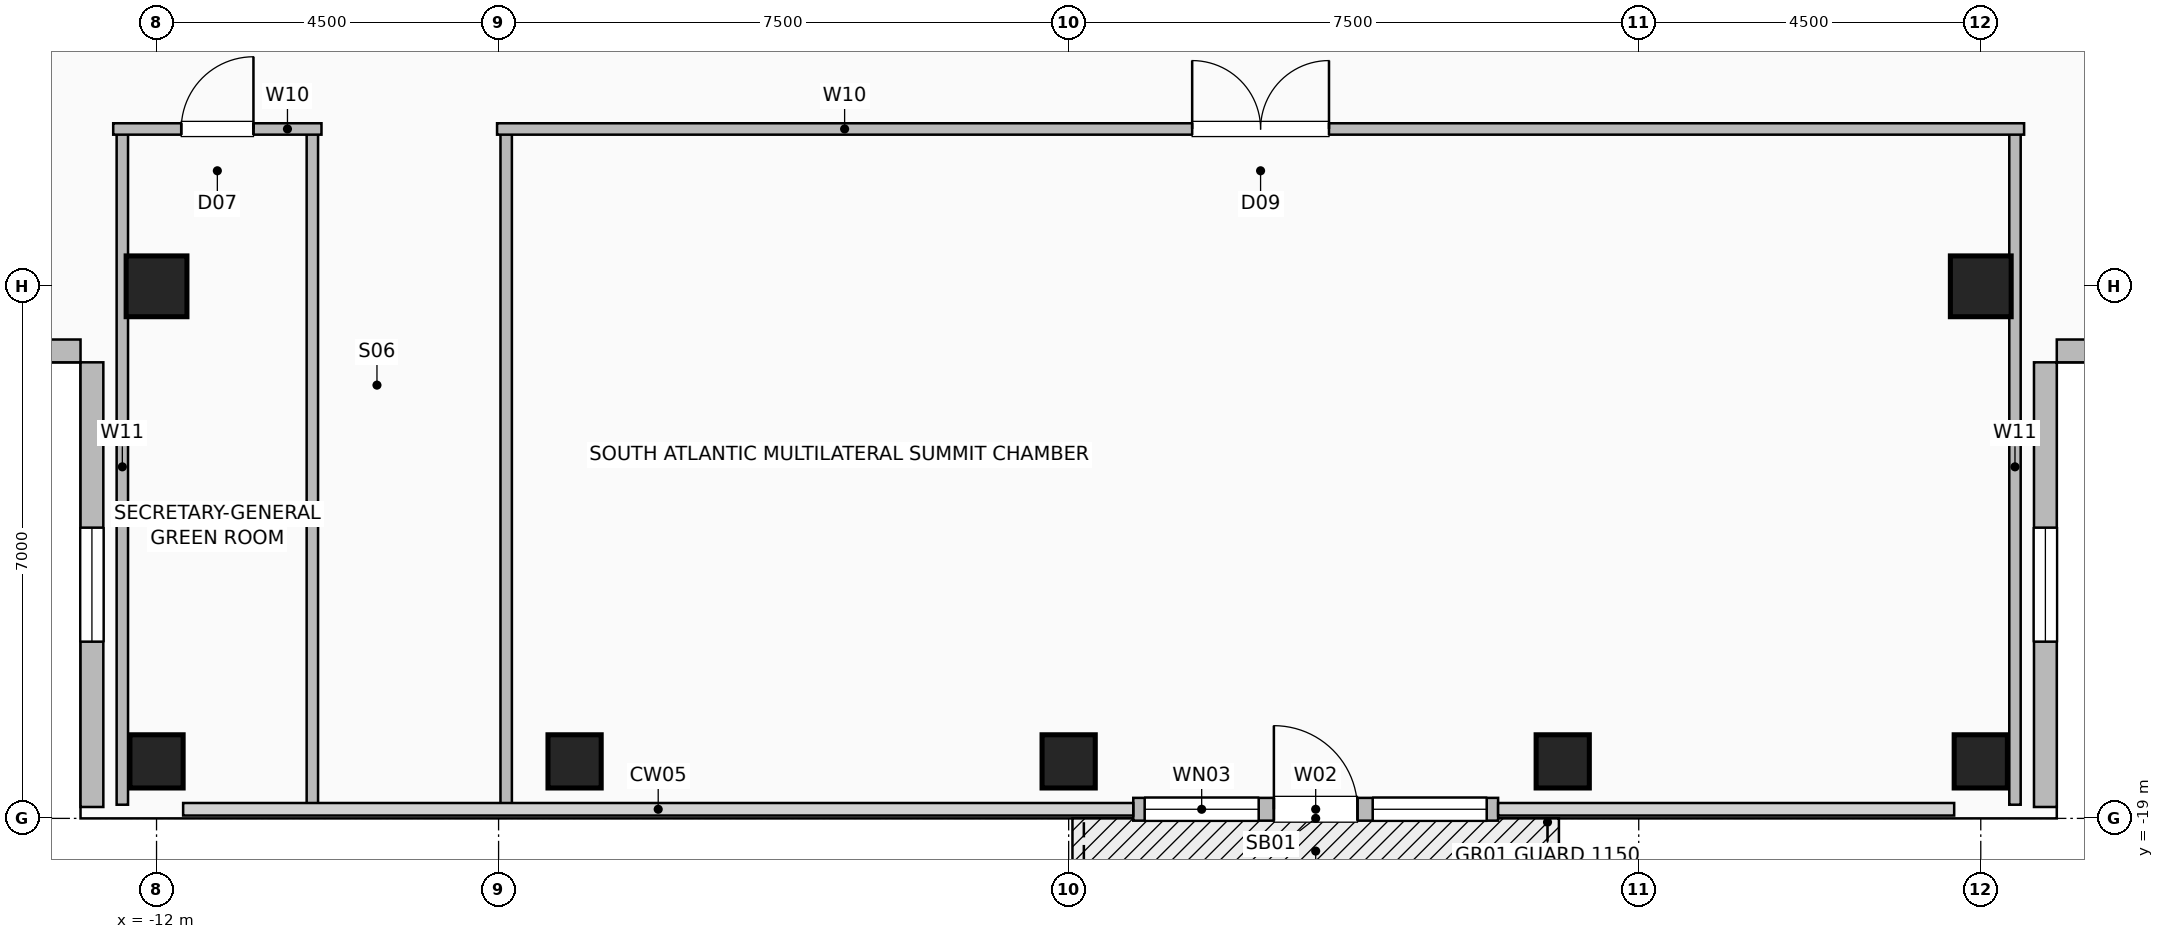
"""IFC4 building model, lengths in metres.
Left out: names, types, materials, properties, quantities, classifications, styles, units other than length and angle.
Written with IfcOpenShell. Run it as: python <this file> out.ifc"""

import sys

from ifc_helpers import new_model, si_unit, direction, frame, frame_2d, origin, origin_2d, place, context, subcontext, project, spatial, rectangle, hollow_rectangle, extrude, element, fill, save


model = new_model("IFC4")
c1 = context("Model", 3, precision=1e-05, world=origin(), true_north=direction((0.0, 1.0)))
c2 = subcontext(c1, "Body", "Model", "MODEL_VIEW")
j1 = project(units=[si_unit("LENGTHUNIT", "METRE"), si_unit("PLANEANGLEUNIT", "RADIAN")], contexts=[c1])
p1 = place(None, origin())
s1 = spatial("IfcSite", under=j1, at=p1, CompositionType="ELEMENT")
p2 = place(p1, origin())
s2 = spatial("IfcBuilding", under=s1, at=p2, CompositionType="ELEMENT")
p3 = place(p2, frame((0.0, 0.0, 243.2)))
s3 = spatial("IfcBuildingStorey", under=s2, at=p3, CompositionType="ELEMENT", Elevation=243.2)
for number, where, z_axis, x_axis in (
    (1, (-12.0, -18.25, 0.0), (0.0, 0.0, 1.0), (1.0, 0.0, 0.0)),
    (2, (-6.5, -18.25, 0.0), (0.0, 0.0, 1.0), (1.0, 0.0, 0.0)),
    (3, (0.0, -18.25, 0.0), (0.0, 0.0, 1.0), (1.0, 0.0, 0.0)),
    (4, (6.5, -18.25, 0.0), (0.0, 0.0, 1.0), (1.0, 0.0, 0.0)),
    (5, (12.0, -18.25, 0.0), (0.0, 0.0, 1.0), (1.0, 0.0, 0.0)),
):
    element("IfcColumn", number, at=place(p3, frame(where, z_axis=z_axis, x_axis=x_axis)), inside=s3, PredefinedType="COLUMN", context=c2, shape_type="SweptSolid", body=[
        extrude(hollow_rectangle(XDim=0.7, YDim=0.7, WallThickness=0.035, at=origin_2d()), origin(), (0.0, 0.0, 1.0), 3.6),
    ])
for number, where, z_axis, x_axis in (
    (6, (-12.0, -12.0, 0.0), (0.0, 0.0, 1.0), (1.0, 0.0, 0.0)),
    (7, (12.0, -12.0, 0.0), (0.0, 0.0, 1.0), (1.0, 0.0, 0.0)),
):
    element("IfcColumn", number, at=place(p3, frame(where, z_axis=z_axis, x_axis=x_axis)), inside=s3, PredefinedType="COLUMN", context=c2, shape_type="SweptSolid", body=[
        extrude(hollow_rectangle(XDim=0.8, YDim=0.8, WallThickness=0.04, at=origin_2d()), origin(), (0.0, 0.0, 1.0), 3.6),
    ])
p4 = place(p3, frame((0.85, -18.88, 0.0), z_axis=(0.0, 0.0, 1.0), x_axis=(1.0, 0.0, 0.0)))
e8 = element("IfcWall", 8, at=p4, inside=s3, PredefinedType="SOLIDWALL", context=c2, shape_type="SweptSolid", body=[
    extrude(rectangle(XDim=4.8, YDim=0.3, at=frame_2d((2.4, 0.0))), origin(), (0.0, 0.0, 1.0), 3.36),
])
p5 = place(p4, frame((1.85, 0.0, 0.0)))
e9 = element("IfcOpeningElement", 9, at=p5, cuts=e8, PredefinedType="OPENING", context=c2, shape_type="SweptSolid", body=[
    extrude(rectangle(XDim=1.1, YDim=2.2, at=frame_2d((0.55, 1.1))), frame((0.0, 0.16, 0.0), z_axis=(0.0, -1.0, 0.0), x_axis=(1.0, 0.0, 0.0)), (0.0, 0.0, 1.0), 0.32),
])
p6 = place(p4, frame((0.15, 0.0, 0.85)))
e10 = element("IfcOpeningElement", 10, at=p6, cuts=e8, PredefinedType="OPENING", context=c2, shape_type="SweptSolid", body=[
    extrude(rectangle(XDim=1.5, YDim=1.8, at=frame_2d((0.75, 0.9))), frame((0.0, 0.16, 0.0), z_axis=(0.0, -1.0, 0.0), x_axis=(1.0, 0.0, 0.0)), (0.0, 0.0, 1.0), 0.32),
])
p7 = place(p4, frame((3.15, 0.0, 0.85)))
e11 = element("IfcOpeningElement", 11, at=p7, cuts=e8, PredefinedType="OPENING", context=c2, shape_type="SweptSolid", body=[
    extrude(rectangle(XDim=1.5, YDim=1.8, at=frame_2d((0.75, 0.9))), frame((0.0, 0.16, 0.0), z_axis=(0.0, -1.0, 0.0), x_axis=(1.0, 0.0, 0.0)), (0.0, 0.0, 1.0), 0.32),
])
p8 = place(p3, frame((-12.85, -18.85, 0.0), z_axis=(0.0, 0.0, 1.0), x_axis=(0.0, 1.0, 0.0)))
e12 = element("IfcWall", 12, at=p8, inside=s3, PredefinedType="SOLIDWALL", context=c2, shape_type="SweptSolid", body=[
    extrude(rectangle(XDim=5.85, YDim=0.3, at=frame_2d((2.925, 0.0))), origin(), (0.0, 0.0, 1.0), 3.36),
])
p9 = place(p8, frame((2.175, 0.0, 0.9)))
e13 = element("IfcOpeningElement", 13, at=p9, cuts=e12, PredefinedType="OPENING", context=c2, shape_type="SweptSolid", body=[
    extrude(rectangle(XDim=1.5, YDim=1.8, at=frame_2d((0.75, 0.9))), frame((0.0, 0.16, 0.0), z_axis=(0.0, -1.0, 0.0), x_axis=(1.0, 0.0, 0.0)), (0.0, 0.0, 1.0), 0.32),
])
p10 = place(p3, frame((-18.85, -12.85, 0.0), z_axis=(0.0, 0.0, 1.0), x_axis=(1.0, 0.0, 0.0)))
e14 = element("IfcWall", 14, at=p10, inside=s3, PredefinedType="SOLIDWALL", context=c2, shape_type="SweptSolid", body=[
    extrude(rectangle(XDim=5.85, YDim=0.3, at=frame_2d((2.925, 0.0))), origin(), (0.0, 0.0, 1.0), 3.36),
])
p11 = place(p3, frame((12.85, -18.85, 0.0), z_axis=(0.0, 0.0, 1.0), x_axis=(0.0, 1.0, 0.0)))
e15 = element("IfcWall", 15, at=p11, inside=s3, PredefinedType="SOLIDWALL", context=c2, shape_type="SweptSolid", body=[
    extrude(rectangle(XDim=5.85, YDim=0.3, at=frame_2d((2.925, 0.0))), origin(), (0.0, 0.0, 1.0), 3.36),
])
p12 = place(p11, frame((2.175, 0.0, 0.9)))
e16 = element("IfcOpeningElement", 16, at=p12, cuts=e15, PredefinedType="OPENING", context=c2, shape_type="SweptSolid", body=[
    extrude(rectangle(XDim=1.5, YDim=1.8, at=frame_2d((0.75, 0.9))), frame((0.0, 0.16, 0.0), z_axis=(0.0, -1.0, 0.0), x_axis=(1.0, 0.0, 0.0)), (0.0, 0.0, 1.0), 0.32),
])
p13 = place(p3, frame((18.85, -12.85, 0.0), z_axis=(0.0, 0.0, 1.0), x_axis=(-1.0, 0.0, 0.0)))
e17 = element("IfcWall", 17, at=p13, inside=s3, PredefinedType="SOLIDWALL", context=c2, shape_type="SweptSolid", body=[
    extrude(rectangle(XDim=5.85, YDim=0.3, at=frame_2d((2.925, 0.0))), origin(), (0.0, 0.0, 1.0), 3.36),
])
for number, where, z_axis, x_axis in (
    (18, (-12.45, -18.82, 0.0), (0.0, 0.0, 1.0), (0.0, 1.0, 0.0)),
    (19, (-9.95, -18.82, 0.0), (0.0, 0.0, 1.0), (0.0, 1.0, 0.0)),
):
    element("IfcWall", number, at=place(p3, frame(where, z_axis=z_axis, x_axis=x_axis)), inside=s3, PredefinedType="PARTITIONING", context=c2, shape_type="SweptSolid", body=[
        extrude(rectangle(XDim=8.89, YDim=0.15, at=frame_2d((4.445, 0.0))), origin(), (0.0, 0.0, 1.0), 3.36),
    ])
p14 = place(p3, frame((-12.57, -9.93, 0.0), z_axis=(0.0, 0.0, 1.0), x_axis=(1.0, 0.0, 0.0)))
e20 = element("IfcWall", 20, at=p14, inside=s3, PredefinedType="PARTITIONING", context=c2, shape_type="SweptSolid", body=[
    extrude(rectangle(XDim=2.74, YDim=0.15, at=frame_2d((1.37, 0.0))), origin(), (0.0, 0.0, 1.0), 3.36),
])
p15 = place(p14, frame((0.895, 0.0, 0.0)))
e21 = element("IfcOpeningElement", 21, at=p15, cuts=e20, PredefinedType="OPENING", context=c2, shape_type="SweptSolid", body=[
    extrude(rectangle(XDim=0.95, YDim=2.06, at=frame_2d((0.475, 1.03))), frame((0.0, 0.085, 0.0), z_axis=(0.0, -1.0, 0.0), x_axis=(1.0, 0.0, 0.0)), (0.0, 0.0, 1.0), 0.17),
])
for number, where, z_axis, x_axis in (
    (22, (-7.4, -18.82, 0.0), (0.0, 0.0, 1.0), (0.0, 1.0, 0.0)),
    (23, (12.45, -18.82, 0.0), (0.0, 0.0, 1.0), (0.0, 1.0, 0.0)),
):
    element("IfcWall", number, at=place(p3, frame(where, z_axis=z_axis, x_axis=x_axis)), inside=s3, PredefinedType="PARTITIONING", context=c2, shape_type="SweptSolid", body=[
        extrude(rectangle(XDim=8.89, YDim=0.15, at=frame_2d((4.445, 0.0))), origin(), (0.0, 0.0, 1.0), 3.36),
    ])
p16 = place(p3, frame((-7.52, -9.93, 0.0), z_axis=(0.0, 0.0, 1.0), x_axis=(1.0, 0.0, 0.0)))
e24 = element("IfcWall", 24, at=p16, inside=s3, PredefinedType="PARTITIONING", context=c2, shape_type="SweptSolid", body=[
    extrude(rectangle(XDim=20.09, YDim=0.15, at=frame_2d((10.045, 0.0))), origin(), (0.0, 0.0, 1.0), 3.36),
])
p17 = place(p16, frame((9.145, 0.0, 0.0)))
e25 = element("IfcOpeningElement", 25, at=p17, cuts=e24, PredefinedType="OPENING", context=c2, shape_type="SweptSolid", body=[
    extrude(rectangle(XDim=1.8, YDim=2.08, at=frame_2d((0.9, 1.04))), frame((0.0, 0.085, 0.0), z_axis=(0.0, -1.0, 0.0), x_axis=(1.0, 0.0, 0.0)), (0.0, 0.0, 1.0), 0.17),
])
p18 = place(p5, origin())
e26 = element("IfcDoor", 26, at=p18, inside=s3, OperationType="SINGLE_SWING_LEFT", PredefinedType="DOOR", context=c2, shape_type="SweptSolid", body=[
    extrude(rectangle(XDim=1.1, YDim=2.2, at=frame_2d((0.55, 1.1))), frame((0.0, 0.025, 0.0), z_axis=(0.0, -1.0, 0.0), x_axis=(1.0, 0.0, 0.0)), (0.0, 0.0, 1.0), 0.05),
])
fill(e9, e26)
p19 = place(p6, origin())
e27 = element("IfcWindow", 27, at=p19, inside=s3, PartitioningType="SINGLE_PANEL", PredefinedType="WINDOW", context=c2, shape_type="SweptSolid", body=[
    extrude(rectangle(XDim=1.5, YDim=1.8, at=frame_2d((0.75, 0.9))), frame((0.0, 0.03, 0.0), z_axis=(0.0, -1.0, 0.0), x_axis=(1.0, 0.0, 0.0)), (0.0, 0.0, 1.0), 0.06),
])
fill(e10, e27)
p20 = place(p7, origin())
e28 = element("IfcWindow", 28, at=p20, inside=s3, PartitioningType="SINGLE_PANEL", PredefinedType="WINDOW", context=c2, shape_type="SweptSolid", body=[
    extrude(rectangle(XDim=1.5, YDim=1.8, at=frame_2d((0.75, 0.9))), frame((0.0, 0.03, 0.0), z_axis=(0.0, -1.0, 0.0), x_axis=(1.0, 0.0, 0.0)), (0.0, 0.0, 1.0), 0.06),
])
fill(e11, e28)
p21 = place(p9, origin())
e29 = element("IfcWindow", 29, at=p21, inside=s3, PartitioningType="SINGLE_PANEL", PredefinedType="WINDOW", context=c2, shape_type="SweptSolid", body=[
    extrude(rectangle(XDim=1.5, YDim=1.8, at=frame_2d((0.75, 0.9))), frame((0.0, 0.03, 0.0), z_axis=(0.0, -1.0, 0.0), x_axis=(1.0, 0.0, 0.0)), (0.0, 0.0, 1.0), 0.06),
])
fill(e13, e29)
p22 = place(p12, origin())
e30 = element("IfcWindow", 30, at=p22, inside=s3, PartitioningType="SINGLE_PANEL", PredefinedType="WINDOW", context=c2, shape_type="SweptSolid", body=[
    extrude(rectangle(XDim=1.5, YDim=1.8, at=frame_2d((0.75, 0.9))), frame((0.0, 0.03, 0.0), z_axis=(0.0, -1.0, 0.0), x_axis=(1.0, 0.0, 0.0)), (0.0, 0.0, 1.0), 0.06),
])
fill(e16, e30)
p23 = place(p15, origin())
e31 = element("IfcDoor", 31, at=p23, inside=s3, OperationType="SINGLE_SWING_RIGHT", PredefinedType="DOOR", context=c2, shape_type="SweptSolid", body=[
    extrude(rectangle(XDim=0.95, YDim=2.06, at=frame_2d((0.475, 1.03))), frame((0.0, 0.025, 0.0), z_axis=(0.0, -1.0, 0.0), x_axis=(1.0, 0.0, 0.0)), (0.0, 0.0, 1.0), 0.05),
])
fill(e21, e31)
p24 = place(p17, origin())
e32 = element("IfcDoor", 32, at=p24, inside=s3, OperationType="DOUBLE_DOOR_SINGLE_SWING", PredefinedType="DOOR", context=c2, shape_type="SweptSolid", body=[
    extrude(rectangle(XDim=1.8, YDim=2.08, at=frame_2d((0.9, 1.04))), frame((0.0, 0.025, 0.0), z_axis=(0.0, -1.0, 0.0), x_axis=(1.0, 0.0, 0.0)), (0.0, 0.0, 1.0), 0.05),
])
fill(e25, e32)
save(model, sys.argv[1])
